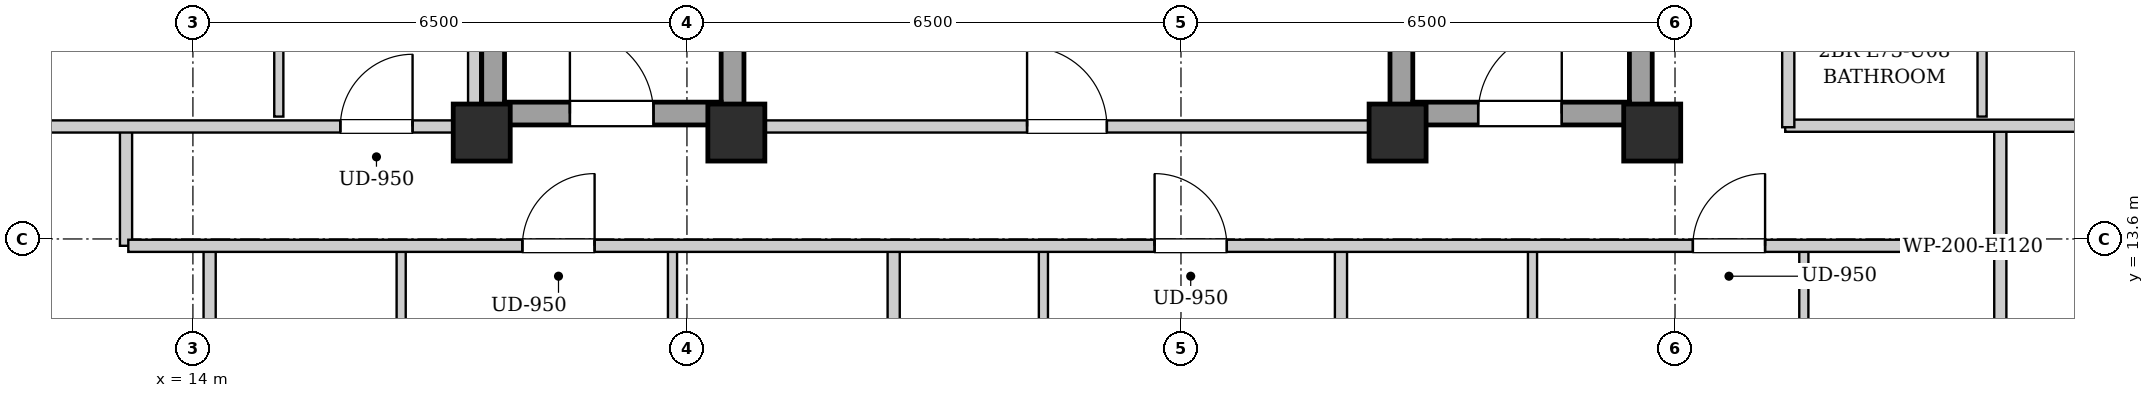
"""IFC4 building model, lengths in metres.
Left out: names, types, materials, properties, quantities, classifications, styles, units other than length and angle.
Written with IfcOpenShell. Run it as: python <this file> out.ifc"""

import sys

from ifc_helpers import new_model, si_unit, direction, frame, frame_2d, origin, origin_2d, place, context, subcontext, project, spatial, rectangle, extrude, element, fill, save


model = new_model("IFC4")
c1 = context("Model", 3, precision=1e-05, world=origin(), true_north=direction((0.0, 1.0)))
c2 = subcontext(c1, "Body", "Model", "MODEL_VIEW")
j1 = project(units=[si_unit("LENGTHUNIT", "METRE"), si_unit("PLANEANGLEUNIT", "RADIAN")], contexts=[c1])
p1 = place(None, origin())
s1 = spatial("IfcSite", under=j1, at=p1, CompositionType="ELEMENT")
p2 = place(p1, origin())
s2 = spatial("IfcBuilding", under=s1, at=p2, CompositionType="ELEMENT")
p3 = place(p2, frame((0.0, 0.0, 251.3)))
s3 = spatial("IfcBuildingStorey", under=s2, at=p3, CompositionType="ELEMENT", Elevation=251.3)
for number, where, z_axis, x_axis in (
    (1, (17.8, 15.0, 0.0), (0.0, 0.0, 1.0), (1.0, 0.0, 0.0)),
    (2, (21.15, 15.0, 0.0), (0.0, 0.0, 1.0), (1.0, 0.0, 0.0)),
    (3, (29.85, 15.0, 0.0), (0.0, 0.0, 1.0), (1.0, 0.0, 0.0)),
    (4, (33.2, 15.0, 0.0), (0.0, 0.0, 1.0), (1.0, 0.0, 0.0)),
):
    element("IfcColumn", number, at=place(p3, frame(where, z_axis=z_axis, x_axis=x_axis)), inside=s3, PredefinedType="COLUMN", context=c2, shape_type="SweptSolid", body=[
        extrude(rectangle(XDim=0.75, YDim=0.75, at=origin_2d()), origin(), (0.0, 0.0, 1.0), 3.4),
    ])
for number, where, z_axis, x_axis in (
    (5, (17.95, 15.1, 0.0), (0.0, 0.0, 1.0), (0.0, 1.0, 0.0)),
    (6, (21.1, 15.1, 0.0), (0.0, 0.0, 1.0), (0.0, 1.0, 0.0)),
):
    element("IfcWall", number, at=place(p3, frame(where, z_axis=z_axis, x_axis=x_axis)), inside=s3, PredefinedType="SHEAR", context=c2, shape_type="SweptSolid", body=[
        extrude(rectangle(XDim=9.0, YDim=0.3, at=frame_2d((4.5, 0.0))), origin(), (0.0, 0.0, 1.0), 3.14),
    ])
p4 = place(p3, frame((18.1, 15.25, 0.0), z_axis=(0.0, 0.0, 1.0), x_axis=(1.0, 0.0, 0.0)))
e7 = element("IfcWall", 7, at=p4, inside=s3, PredefinedType="SHEAR", context=c2, shape_type="SweptSolid", body=[
    extrude(rectangle(XDim=2.85, YDim=0.3, at=frame_2d((1.425, 0.0))), origin(), (0.0, 0.0, 1.0), 3.14),
])
p5 = place(p4, frame((0.86, 0.0, 0.0)))
e8 = element("IfcOpeningElement", 8, at=p5, cuts=e7, PredefinedType="OPENING", context=c2, shape_type="SweptSolid", body=[
    extrude(rectangle(XDim=1.1, YDim=2.05, at=frame_2d((0.55, 1.025))), frame((0.0, 0.16, 0.0), z_axis=(0.0, -1.0, 0.0), x_axis=(1.0, 0.0, 0.0)), (0.0, 0.0, 1.0), 0.32),
])
for number, where, z_axis, x_axis in (
    (9, (29.9, 15.1, 0.0), (0.0, 0.0, 1.0), (0.0, 1.0, 0.0)),
    (10, (33.05, 15.1, 0.0), (0.0, 0.0, 1.0), (0.0, 1.0, 0.0)),
):
    element("IfcWall", number, at=place(p3, frame(where, z_axis=z_axis, x_axis=x_axis)), inside=s3, PredefinedType="SHEAR", context=c2, shape_type="SweptSolid", body=[
        extrude(rectangle(XDim=9.0, YDim=0.3, at=frame_2d((4.5, 0.0))), origin(), (0.0, 0.0, 1.0), 3.14),
    ])
p6 = place(p3, frame((30.05, 15.25, 0.0), z_axis=(0.0, 0.0, 1.0), x_axis=(1.0, 0.0, 0.0)))
e11 = element("IfcWall", 11, at=p6, inside=s3, PredefinedType="SHEAR", context=c2, shape_type="SweptSolid", body=[
    extrude(rectangle(XDim=2.85, YDim=0.3, at=frame_2d((1.425, 0.0))), origin(), (0.0, 0.0, 1.0), 3.14),
])
p7 = place(p6, frame((0.86, 0.0, 0.0)))
e12 = element("IfcOpeningElement", 12, at=p7, cuts=e11, PredefinedType="OPENING", context=c2, shape_type="SweptSolid", body=[
    extrude(rectangle(XDim=1.1, YDim=2.05, at=frame_2d((0.55, 1.025))), frame((0.0, 0.16, 0.0), z_axis=(0.0, -1.0, 0.0), x_axis=(1.0, 0.0, 0.0)), (0.0, 0.0, 1.0), 0.32),
])
p8 = place(p3, frame((21.25, 15.08, 0.0), z_axis=(0.0, 0.0, 1.0), x_axis=(1.0, 0.0, 0.0)))
e13 = element("IfcWall", 13, at=p8, inside=s3, PredefinedType="PARTITIONING", context=c2, shape_type="SweptSolid", body=[
    extrude(rectangle(XDim=8.5, YDim=0.16, at=frame_2d((4.25, 0.0))), origin(), (0.0, 0.0, 1.0), 2.668),
])
p9 = place(p8, frame((3.725, 0.0, 0.0)))
e14 = element("IfcOpeningElement", 14, at=p9, cuts=e13, PredefinedType="OPENING", context=c2, shape_type="SweptSolid", body=[
    extrude(rectangle(XDim=1.05, YDim=2.05, at=frame_2d((0.525, 1.025))), frame((0.0, 0.09, 0.0), z_axis=(0.0, -1.0, 0.0), x_axis=(1.0, 0.0, 0.0)), (0.0, 0.0, 1.0), 0.18),
])
for number, where, z_axis, x_axis in (
    (15, (13.12, 13.51, 0.0), (0.0, 0.0, 1.0), (0.0, 1.0, 0.0)),
    (16, (37.78, 13.51, 0.0), (0.0, 0.0, 1.0), (0.0, 1.0, 0.0)),
):
    element("IfcWall", number, at=place(p3, frame(where, z_axis=z_axis, x_axis=x_axis)), inside=s3, PredefinedType="PARTITIONING", context=c2, shape_type="SweptSolid", body=[
        extrude(rectangle(XDim=1.58, YDim=0.16, at=frame_2d((0.79, 0.0))), origin(), (0.0, 0.0, 1.0), 3.14),
    ])
p10 = place(p3, frame((34.95, 15.09, 0.0), z_axis=(0.0, 0.0, 1.0), x_axis=(1.0, 0.0, 0.0)))
e17 = element("IfcWall", 17, at=p10, inside=s3, PredefinedType="PARTITIONING", context=c2, shape_type="SweptSolid", body=[
    extrude(rectangle(XDim=5.07, YDim=0.16, at=frame_2d((2.535, 0.0))), origin(), (0.0, 0.0, 1.0), 2.668),
])
p11 = place(p3, frame((14.22, 4.08, 0.0), z_axis=(0.0, 0.0, 1.0), x_axis=(0.0, 1.0, 0.0)))
e18 = element("IfcWall", 18, at=p11, inside=s3, PredefinedType="PARTITIONING", context=c2, shape_type="SweptSolid", body=[
    extrude(rectangle(XDim=9.39, YDim=0.16, at=frame_2d((4.695, 0.0))), origin(), (0.0, 0.0, 1.0), 3.14),
])
p12 = place(p3, frame((16.74, 10.62, 0.0), z_axis=(0.0, 0.0, 1.0), x_axis=(0.0, 1.0, 0.0)))
e19 = element("IfcWall", 19, at=p12, inside=s3, PredefinedType="PARTITIONING", context=c2, shape_type="SweptSolid", body=[
    extrude(rectangle(XDim=2.85, YDim=0.12, at=frame_2d((1.425, 0.0))), origin(), (0.0, 0.0, 1.0), 3.14),
])
p13 = place(p12, frame((0.995, 0.0, 0.0)))
e20 = element("IfcOpeningElement", 20, at=p13, cuts=e19, PredefinedType="OPENING", context=c2, shape_type="SweptSolid", body=[
    extrude(rectangle(XDim=0.86, YDim=2.05, at=frame_2d((0.43, 1.025))), frame((0.0, 0.07, 0.0), z_axis=(0.0, -1.0, 0.0), x_axis=(1.0, 0.0, 0.0)), (0.0, 0.0, 1.0), 0.14),
])
p14 = place(p3, frame((20.31, 10.62, 0.0), z_axis=(0.0, 0.0, 1.0), x_axis=(0.0, 1.0, 0.0)))
e21 = element("IfcWall", 21, at=p14, inside=s3, PredefinedType="PARTITIONING", context=c2, shape_type="SweptSolid", body=[
    extrude(rectangle(XDim=2.85, YDim=0.12, at=frame_2d((1.425, 0.0))), origin(), (0.0, 0.0, 1.0), 3.14),
])
p15 = place(p14, frame((0.975, 0.0, 0.0)))
e22 = element("IfcOpeningElement", 22, at=p15, cuts=e21, PredefinedType="OPENING", context=c2, shape_type="SweptSolid", body=[
    extrude(rectangle(XDim=0.9, YDim=2.05, at=frame_2d((0.45, 1.025))), frame((0.0, 0.07, 0.0), z_axis=(0.0, -1.0, 0.0), x_axis=(1.0, 0.0, 0.0)), (0.0, 0.0, 1.0), 0.14),
])
p16 = place(p3, frame((23.22, 4.08, 0.0), z_axis=(0.0, 0.0, 1.0), x_axis=(0.0, 1.0, 0.0)))
e23 = element("IfcWall", 23, at=p16, inside=s3, PredefinedType="PARTITIONING", context=c2, shape_type="SweptSolid", body=[
    extrude(rectangle(XDim=9.39, YDim=0.16, at=frame_2d((4.695, 0.0))), origin(), (0.0, 0.0, 1.0), 3.14),
])
p17 = place(p3, frame((25.19, 10.62, 0.0), z_axis=(0.0, 0.0, 1.0), x_axis=(0.0, 1.0, 0.0)))
e24 = element("IfcWall", 24, at=p17, inside=s3, PredefinedType="PARTITIONING", context=c2, shape_type="SweptSolid", body=[
    extrude(rectangle(XDim=2.85, YDim=0.12, at=frame_2d((1.425, 0.0))), origin(), (0.0, 0.0, 1.0), 3.14),
])
p18 = place(p17, frame((0.995, 0.0, 0.0)))
e25 = element("IfcOpeningElement", 25, at=p18, cuts=e24, PredefinedType="OPENING", context=c2, shape_type="SweptSolid", body=[
    extrude(rectangle(XDim=0.86, YDim=2.05, at=frame_2d((0.43, 1.025))), frame((0.0, 0.07, 0.0), z_axis=(0.0, -1.0, 0.0), x_axis=(1.0, 0.0, 0.0)), (0.0, 0.0, 1.0), 0.14),
])
p19 = place(p3, frame((37.78, 10.56, 0.0), z_axis=(0.0, 0.0, 1.0), x_axis=(0.0, 1.0, 0.0)))
e26 = element("IfcWall", 26, at=p19, inside=s3, PredefinedType="PARTITIONING", context=c2, shape_type="SweptSolid", body=[
    extrude(rectangle(XDim=2.91, YDim=0.16, at=frame_2d((1.455, 0.0))), origin(), (0.0, 0.0, 1.0), 3.14),
])
p20 = place(p3, frame((29.105, 4.08, 0.0), z_axis=(0.0, 0.0, 1.0), x_axis=(0.0, 1.0, 0.0)))
e27 = element("IfcWall", 27, at=p20, inside=s3, PredefinedType="PARTITIONING", context=c2, shape_type="SweptSolid", body=[
    extrude(rectangle(XDim=9.39, YDim=0.16, at=frame_2d((4.695, 0.0))), origin(), (0.0, 0.0, 1.0), 3.14),
])
p21 = place(p3, frame((31.625, 10.62, 0.0), z_axis=(0.0, 0.0, 1.0), x_axis=(0.0, 1.0, 0.0)))
e28 = element("IfcWall", 28, at=p21, inside=s3, PredefinedType="PARTITIONING", context=c2, shape_type="SweptSolid", body=[
    extrude(rectangle(XDim=2.85, YDim=0.12, at=frame_2d((1.425, 0.0))), origin(), (0.0, 0.0, 1.0), 3.14),
])
p22 = place(p21, frame((0.995, 0.0, 0.0)))
e29 = element("IfcOpeningElement", 29, at=p22, cuts=e28, PredefinedType="OPENING", context=c2, shape_type="SweptSolid", body=[
    extrude(rectangle(XDim=0.86, YDim=2.05, at=frame_2d((0.43, 1.025))), frame((0.0, 0.07, 0.0), z_axis=(0.0, -1.0, 0.0), x_axis=(1.0, 0.0, 0.0)), (0.0, 0.0, 1.0), 0.14),
])
p23 = place(p3, frame((35.195, 10.62, 0.0), z_axis=(0.0, 0.0, 1.0), x_axis=(0.0, 1.0, 0.0)))
e30 = element("IfcWall", 30, at=p23, inside=s3, PredefinedType="PARTITIONING", context=c2, shape_type="SweptSolid", body=[
    extrude(rectangle(XDim=2.85, YDim=0.12, at=frame_2d((1.425, 0.0))), origin(), (0.0, 0.0, 1.0), 3.14),
])
p24 = place(p23, frame((0.975, 0.0, 0.0)))
e31 = element("IfcOpeningElement", 31, at=p24, cuts=e30, PredefinedType="OPENING", context=c2, shape_type="SweptSolid", body=[
    extrude(rectangle(XDim=0.9, YDim=2.05, at=frame_2d((0.45, 1.025))), frame((0.0, 0.07, 0.0), z_axis=(0.0, -1.0, 0.0), x_axis=(1.0, 0.0, 0.0)), (0.0, 0.0, 1.0), 0.14),
])
p25 = place(p3, frame((10.88, 15.08, 0.0), z_axis=(0.0, 0.0, 1.0), x_axis=(1.0, 0.0, 0.0)))
e32 = element("IfcWall", 32, at=p25, inside=s3, PredefinedType="PARTITIONING", context=c2, shape_type="SweptSolid", body=[
    extrude(rectangle(XDim=6.88, YDim=0.16, at=frame_2d((3.44, 0.0))), origin(), (0.0, 0.0, 1.0), 2.668),
])
p26 = place(p25, frame((5.06, 0.0, 0.0)))
e33 = element("IfcOpeningElement", 33, at=p26, cuts=e32, PredefinedType="OPENING", context=c2, shape_type="SweptSolid", body=[
    extrude(rectangle(XDim=0.95, YDim=2.1, at=frame_2d((0.475, 1.05))), frame((0.0, 0.09, 0.0), z_axis=(0.0, -1.0, 0.0), x_axis=(1.0, 0.0, 0.0)), (0.0, 0.0, 1.0), 0.18),
])
p27 = place(p3, frame((15.13, 15.21, 0.0), z_axis=(0.0, 0.0, 1.0), x_axis=(0.0, 1.0, 0.0)))
e34 = element("IfcWall", 34, at=p27, inside=s3, PredefinedType="PARTITIONING", context=c2, shape_type="SweptSolid", body=[
    extrude(rectangle(XDim=4.5, YDim=0.12, at=frame_2d((2.25, 0.0))), origin(), (0.0, 0.0, 1.0), 3.14),
])
p28 = place(p27, frame((1.8, 0.0, 0.0)))
e35 = element("IfcOpeningElement", 35, at=p28, cuts=e34, PredefinedType="OPENING", context=c2, shape_type="SweptSolid", body=[
    extrude(rectangle(XDim=0.9, YDim=2.05, at=frame_2d((0.45, 1.025))), frame((0.0, 0.07, 0.0), z_axis=(0.0, -1.0, 0.0), x_axis=(1.0, 0.0, 0.0)), (0.0, 0.0, 1.0), 0.14),
])
p29 = place(p3, frame((37.54, 15.21, 0.0), z_axis=(0.0, 0.0, 1.0), x_axis=(0.0, 1.0, 0.0)))
e36 = element("IfcWall", 36, at=p29, inside=s3, PredefinedType="PARTITIONING", context=c2, shape_type="SweptSolid", body=[
    extrude(rectangle(XDim=2.3, YDim=0.12, at=frame_2d((1.15, 0.0))), origin(), (0.0, 0.0, 1.0), 3.14),
])
p30 = place(p3, frame((13.15, 13.51, 0.0), z_axis=(0.0, 0.0, 1.0), x_axis=(1.0, 0.0, 0.0)))
e37 = element("IfcWall", 37, at=p30, inside=s3, PredefinedType="PARTITIONING", context=c2, shape_type="SweptSolid", body=[
    extrude(rectangle(XDim=24.6, YDim=0.16, at=frame_2d((12.3, 0.0))), origin(), (0.0, 0.0, 1.0), 3.14),
])
p31 = place(p30, frame((5.185, 0.0, 0.0)))
e38 = element("IfcOpeningElement", 38, at=p31, cuts=e37, PredefinedType="OPENING", context=c2, shape_type="SweptSolid", body=[
    extrude(rectangle(XDim=0.95, YDim=2.1, at=frame_2d((0.475, 1.05))), frame((0.0, 0.09, 0.0), z_axis=(0.0, -1.0, 0.0), x_axis=(1.0, 0.0, 0.0)), (0.0, 0.0, 1.0), 0.18),
])
p32 = place(p30, frame((13.503, 0.0, 0.0)))
e39 = element("IfcOpeningElement", 39, at=p32, cuts=e37, PredefinedType="OPENING", context=c2, shape_type="SweptSolid", body=[
    extrude(rectangle(XDim=0.95, YDim=2.1, at=frame_2d((0.475, 1.05))), frame((0.0, 0.09, 0.0), z_axis=(0.0, -1.0, 0.0), x_axis=(1.0, 0.0, 0.0)), (0.0, 0.0, 1.0), 0.18),
])
p33 = place(p30, frame((20.585, 0.0, 0.0)))
e40 = element("IfcOpeningElement", 40, at=p33, cuts=e37, PredefinedType="OPENING", context=c2, shape_type="SweptSolid", body=[
    extrude(rectangle(XDim=0.95, YDim=2.1, at=frame_2d((0.475, 1.05))), frame((0.0, 0.09, 0.0), z_axis=(0.0, -1.0, 0.0), x_axis=(1.0, 0.0, 0.0)), (0.0, 0.0, 1.0), 0.18),
])
p34 = place(p3, frame((17.7, 15.02, 0.0), z_axis=(0.0, 0.0, 1.0), x_axis=(0.0, 1.0, 0.0)))
e41 = element("IfcWall", 41, at=p34, inside=s3, PredefinedType="PARTITIONING", context=c2, shape_type="SweptSolid", body=[
    extrude(rectangle(XDim=13.98, YDim=0.16, at=frame_2d((6.99, 0.0))), origin(), (0.0, 0.0, 1.0), 3.14),
])
p35 = place(p3, frame((34.99, 15.07, 0.0), z_axis=(0.0, 0.0, 1.0), x_axis=(0.0, 1.0, 0.0)))
e42 = element("IfcWall", 42, at=p35, inside=s3, PredefinedType="PARTITIONING", context=c2, shape_type="SweptSolid", body=[
    extrude(rectangle(XDim=13.93, YDim=0.16, at=frame_2d((6.965, 0.0))), origin(), (0.0, 0.0, 1.0), 3.14),
])
p36 = place(p35, frame((4.385, 0.0, 0.0)))
e43 = element("IfcOpeningElement", 43, at=p36, cuts=e42, PredefinedType="OPENING", context=c2, shape_type="SweptSolid", body=[
    extrude(rectangle(XDim=0.95, YDim=2.1, at=frame_2d((0.475, 1.05))), frame((0.0, 0.09, 0.0), z_axis=(0.0, -1.0, 0.0), x_axis=(1.0, 0.0, 0.0)), (0.0, 0.0, 1.0), 0.18),
])
p37 = place(p5, origin())
e44 = element("IfcDoor", 44, at=p37, inside=s3, OperationType="SINGLE_SWING_LEFT", PredefinedType="DOOR", context=c2, shape_type="SweptSolid", body=[
    extrude(rectangle(XDim=1.1, YDim=2.05, at=frame_2d((0.55, 1.025))), frame((0.0, 0.025, 0.0), z_axis=(0.0, -1.0, 0.0), x_axis=(1.0, 0.0, 0.0)), (0.0, 0.0, 1.0), 0.05),
])
fill(e8, e44)
p38 = place(p7, origin())
e45 = element("IfcDoor", 45, at=p38, inside=s3, OperationType="SINGLE_SWING_RIGHT", PredefinedType="DOOR", context=c2, shape_type="SweptSolid", body=[
    extrude(rectangle(XDim=1.1, YDim=2.05, at=frame_2d((0.55, 1.025))), frame((0.0, 0.025, 0.0), z_axis=(0.0, -1.0, 0.0), x_axis=(1.0, 0.0, 0.0)), (0.0, 0.0, 1.0), 0.05),
])
fill(e12, e45)
p39 = place(p9, origin())
e46 = element("IfcDoor", 46, at=p39, inside=s3, OperationType="SINGLE_SWING_LEFT", PredefinedType="DOOR", context=c2, shape_type="SweptSolid", body=[
    extrude(rectangle(XDim=1.05, YDim=2.05, at=frame_2d((0.525, 1.025))), frame((0.0, 0.025, 0.0), z_axis=(0.0, -1.0, 0.0), x_axis=(1.0, 0.0, 0.0)), (0.0, 0.0, 1.0), 0.05),
])
fill(e14, e46)
p40 = place(p26, origin())
e47 = element("IfcDoor", 47, at=p40, inside=s3, OperationType="SINGLE_SWING_RIGHT", PredefinedType="DOOR", context=c2, shape_type="SweptSolid", body=[
    extrude(rectangle(XDim=0.95, YDim=2.1, at=frame_2d((0.475, 1.05))), frame((0.0, 0.025, 0.0), z_axis=(0.0, -1.0, 0.0), x_axis=(1.0, 0.0, 0.0)), (0.0, 0.0, 1.0), 0.05),
])
fill(e33, e47)
p41 = place(p31, origin())
e48 = element("IfcDoor", 48, at=p41, inside=s3, OperationType="SINGLE_SWING_RIGHT", PredefinedType="DOOR", context=c2, shape_type="SweptSolid", body=[
    extrude(rectangle(XDim=0.95, YDim=2.1, at=frame_2d((0.475, 1.05))), frame((0.0, 0.025, 0.0), z_axis=(0.0, -1.0, 0.0), x_axis=(1.0, 0.0, 0.0)), (0.0, 0.0, 1.0), 0.05),
])
fill(e38, e48)
p42 = place(p32, origin())
e49 = element("IfcDoor", 49, at=p42, inside=s3, OperationType="SINGLE_SWING_LEFT", PredefinedType="DOOR", context=c2, shape_type="SweptSolid", body=[
    extrude(rectangle(XDim=0.95, YDim=2.1, at=frame_2d((0.475, 1.05))), frame((0.0, 0.025, 0.0), z_axis=(0.0, -1.0, 0.0), x_axis=(1.0, 0.0, 0.0)), (0.0, 0.0, 1.0), 0.05),
])
fill(e39, e49)
p43 = place(p33, origin())
e50 = element("IfcDoor", 50, at=p43, inside=s3, OperationType="SINGLE_SWING_RIGHT", PredefinedType="DOOR", context=c2, shape_type="SweptSolid", body=[
    extrude(rectangle(XDim=0.95, YDim=2.1, at=frame_2d((0.475, 1.05))), frame((0.0, 0.025, 0.0), z_axis=(0.0, -1.0, 0.0), x_axis=(1.0, 0.0, 0.0)), (0.0, 0.0, 1.0), 0.05),
])
fill(e40, e50)
save(model, sys.argv[1])
